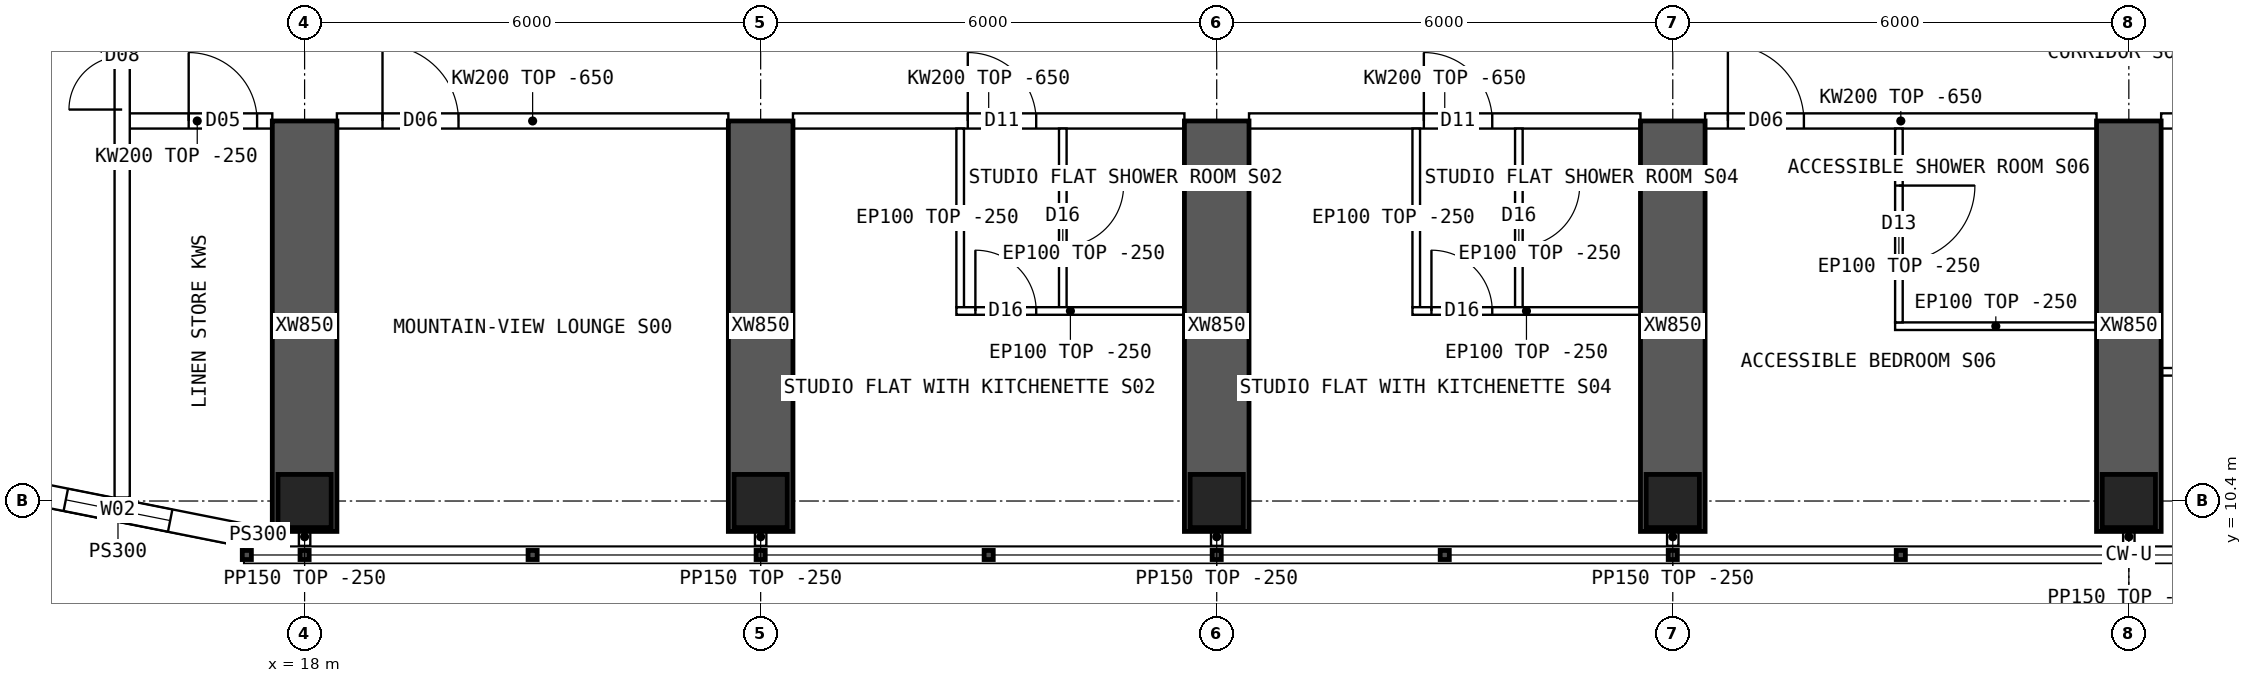
"""IFC4 building model, lengths in metres.
Left out: names, types, materials, properties, quantities, classifications, styles, units other than length and angle.
Written with IfcOpenShell. Run it as: python <this file> out.ifc"""

import sys

from ifc_helpers import new_model, si_unit, direction, frame, frame_2d, origin, origin_2d, place, context, subcontext, project, spatial, polyline, rectangle, hollow_rectangle, outline, extrude, element, fill, save


model = new_model("IFC4")
c1 = context("Model", 3, precision=1e-05, world=origin(), true_north=direction((0.0, 1.0)))
c2 = subcontext(c1, "Body", "Model", "MODEL_VIEW")
j1 = project(units=[si_unit("LENGTHUNIT", "METRE"), si_unit("PLANEANGLEUNIT", "RADIAN")], contexts=[c1])
p1 = place(None, origin())
s1 = spatial("IfcSite", under=j1, at=p1, CompositionType="ELEMENT")
p2 = place(p1, origin())
s2 = spatial("IfcBuilding", under=s1, at=p2, CompositionType="ELEMENT")
p3 = place(p2, frame((0.0, 0.0, 178.6)))
s3 = spatial("IfcBuildingStorey", under=s2, at=p3, CompositionType="ELEMENT", Elevation=178.6)
for number, where, z_axis, x_axis in (
    (1, (18.0, 10.4, 0.0), (0.0, 0.0, 1.0), (1.0, 0.0, 0.0)),
    (2, (24.0, 10.4, 0.0), (0.0, 0.0, 1.0), (1.0, 0.0, 0.0)),
    (3, (30.0, 10.4, 0.0), (0.0, 0.0, 1.0), (1.0, 0.0, 0.0)),
    (4, (36.0, 10.4, 0.0), (0.0, 0.0, 1.0), (1.0, 0.0, 0.0)),
    (5, (42.0, 10.4, 0.0), (0.0, 0.0, 1.0), (1.0, 0.0, 0.0)),
):
    element("IfcColumn", number, at=place(p3, frame(where, z_axis=z_axis, x_axis=x_axis)), inside=s3, PredefinedType="COLUMN", context=c2, shape_type="SweptSolid", body=[
        extrude(hollow_rectangle(XDim=0.7, YDim=0.7, WallThickness=0.07, at=origin_2d()), origin(), (0.0, 0.0, 1.0), 3.75),
    ])
for number, where, z_axis, x_axis in (
    (6, (18.0, 10.0, 0.0), (0.0, 0.0, 1.0), (0.0, 1.0, 0.0)),
    (7, (24.0, 10.0, 0.0), (0.0, 0.0, 1.0), (0.0, 1.0, 0.0)),
    (8, (30.0, 10.0, 0.0), (0.0, 0.0, 1.0), (0.0, 1.0, 0.0)),
    (9, (36.0, 10.0, 0.0), (0.0, 0.0, 1.0), (0.0, 1.0, 0.0)),
    (10, (42.0, 10.0, 0.0), (0.0, 0.0, 1.0), (0.0, 1.0, 0.0)),
):
    element("IfcWall", number, at=place(p3, frame(where, z_axis=z_axis, x_axis=x_axis)), inside=s3, PredefinedType="SHEAR", context=c2, shape_type="SweptSolid", body=[
        extrude(rectangle(XDim=5.4, YDim=0.85, at=frame_2d((2.7, 0.0))), origin(), (0.0, 0.0, 1.0), 3.75),
    ])
p4 = place(p3, frame((13.89, 10.608, 0.0), z_axis=(0.0, 0.0, 1.0), x_axis=(0.98078325777, -0.195100490205, 0.0)))
e11 = element("IfcWall", 11, at=p4, inside=s3, PredefinedType="SOLIDWALL", context=c2, shape_type="SweptSolid", body=[
    extrude(outline(polyline([(-0.03, -0.15), (3.405, -0.15), (3.345, 0.15), (0.03, 0.15), (-0.03, -0.15)])), origin(), (0.0, 0.0, 1.0), 3.5),
])
p5 = place(p4, frame((0.988, 0.0, 0.9)))
e12 = element("IfcOpeningElement", 12, at=p5, cuts=e11, PredefinedType="OPENING", context=c2, shape_type="SweptSolid", body=[
    extrude(rectangle(XDim=1.4, YDim=1.8, at=frame_2d((0.7, 0.9))), frame((0.0, 0.16, 0.0), z_axis=(0.0, -1.0, 0.0), x_axis=(1.0, 0.0, 0.0)), (0.0, 0.0, 1.0), 0.32),
])
p6 = place(p3, frame((17.2, 9.95, 0.0), z_axis=(0.0, 0.0, 1.0), x_axis=(1.0, 0.0, 0.0)))
e13 = element("IfcWall", 13, at=p6, inside=s3, PredefinedType="SOLIDWALL", context=c2, shape_type="SweptSolid", body=[
    extrude(rectangle(XDim=0.375, YDim=0.3, at=frame_2d((0.188, 0.0))), origin(), (0.0, 0.0, 1.0), 3.5),
])
p7 = place(p3, frame((15.6, 15.4, 0.0), z_axis=(0.0, 0.0, 1.0), x_axis=(1.0, 0.0, 0.0)))
e14 = element("IfcWall", 14, at=p7, inside=s3, PredefinedType="SOLIDWALL", context=c2, shape_type="SweptSolid", body=[
    extrude(rectangle(XDim=1.975, YDim=0.2, at=frame_2d((0.987, 0.0))), origin(), (0.0, 0.0, 1.0), 3.5),
])
p8 = place(p7, frame((0.875, 0.0, 0.0)))
e15 = element("IfcOpeningElement", 15, at=p8, cuts=e14, PredefinedType="OPENING", context=c2, shape_type="SweptSolid", body=[
    extrude(rectangle(XDim=0.9, YDim=2.1, at=frame_2d((0.45, 1.05))), frame((0.0, 0.11, 0.0), z_axis=(0.0, -1.0, 0.0), x_axis=(1.0, 0.0, 0.0)), (0.0, 0.0, 1.0), 0.22),
])
p9 = place(p3, frame((18.425, 15.4, 0.0), z_axis=(0.0, 0.0, 1.0), x_axis=(1.0, 0.0, 0.0)))
e16 = element("IfcWall", 16, at=p9, inside=s3, PredefinedType="SOLIDWALL", context=c2, shape_type="SweptSolid", body=[
    extrude(outline(polyline([(0.0, 0.0), (5.15, 0.0), (5.15, 3.1), (0.0, 3.1), (0.0, 0.0)])), frame((0.0, 0.1, 0.0), z_axis=(0.0, -1.0, 0.0), x_axis=(1.0, 0.0, 0.0)), (0.0, 0.0, 1.0), 0.2),
])
p10 = place(p9, frame((0.6, 0.0, 0.0)))
e17 = element("IfcOpeningElement", 17, at=p10, cuts=e16, PredefinedType="OPENING", context=c2, shape_type="SweptSolid", body=[
    extrude(rectangle(XDim=1.0, YDim=2.1, at=frame_2d((0.5, 1.05))), frame((0.0, 0.11, 0.0), z_axis=(0.0, -1.0, 0.0), x_axis=(1.0, 0.0, 0.0)), (0.0, 0.0, 1.0), 0.22),
])
p11 = place(p3, frame((24.425, 15.4, 0.0), z_axis=(0.0, 0.0, 1.0), x_axis=(1.0, 0.0, 0.0)))
e18 = element("IfcWall", 18, at=p11, inside=s3, PredefinedType="SOLIDWALL", context=c2, shape_type="SweptSolid", body=[
    extrude(outline(polyline([(0.0, 0.0), (5.15, 0.0), (5.15, 3.1), (0.0, 3.1), (0.0, 0.0)])), frame((0.0, 0.1, 0.0), z_axis=(0.0, -1.0, 0.0), x_axis=(1.0, 0.0, 0.0)), (0.0, 0.0, 1.0), 0.2),
])
p12 = place(p11, frame((2.3, 0.0, 0.0)))
e19 = element("IfcOpeningElement", 19, at=p12, cuts=e18, PredefinedType="OPENING", context=c2, shape_type="SweptSolid", body=[
    extrude(rectangle(XDim=0.9, YDim=2.1, at=frame_2d((0.45, 1.05))), frame((0.0, 0.11, 0.0), z_axis=(0.0, -1.0, 0.0), x_axis=(1.0, 0.0, 0.0)), (0.0, 0.0, 1.0), 0.22),
])
p13 = place(p3, frame((30.425, 15.4, 0.0), z_axis=(0.0, 0.0, 1.0), x_axis=(1.0, 0.0, 0.0)))
e20 = element("IfcWall", 20, at=p13, inside=s3, PredefinedType="SOLIDWALL", context=c2, shape_type="SweptSolid", body=[
    extrude(outline(polyline([(0.0, 0.0), (5.15, 0.0), (5.15, 3.1), (0.0, 3.1), (0.0, 0.0)])), frame((0.0, 0.1, 0.0), z_axis=(0.0, -1.0, 0.0), x_axis=(1.0, 0.0, 0.0)), (0.0, 0.0, 1.0), 0.2),
])
p14 = place(p13, frame((2.3, 0.0, 0.0)))
e21 = element("IfcOpeningElement", 21, at=p14, cuts=e20, PredefinedType="OPENING", context=c2, shape_type="SweptSolid", body=[
    extrude(rectangle(XDim=0.9, YDim=2.1, at=frame_2d((0.45, 1.05))), frame((0.0, 0.11, 0.0), z_axis=(0.0, -1.0, 0.0), x_axis=(1.0, 0.0, 0.0)), (0.0, 0.0, 1.0), 0.22),
])
p15 = place(p3, frame((36.425, 15.4, 0.0), z_axis=(0.0, 0.0, 1.0), x_axis=(1.0, 0.0, 0.0)))
e22 = element("IfcWall", 22, at=p15, inside=s3, PredefinedType="SOLIDWALL", context=c2, shape_type="SweptSolid", body=[
    extrude(outline(polyline([(0.0, 0.0), (5.15, 0.0), (5.15, 3.1), (0.0, 3.1), (0.0, 0.0)])), frame((0.0, 0.1, 0.0), z_axis=(0.0, -1.0, 0.0), x_axis=(1.0, 0.0, 0.0)), (0.0, 0.0, 1.0), 0.2),
])
p16 = place(p15, frame((0.3, 0.0, 0.0)))
e23 = element("IfcOpeningElement", 23, at=p16, cuts=e22, PredefinedType="OPENING", context=c2, shape_type="SweptSolid", body=[
    extrude(rectangle(XDim=1.0, YDim=2.1, at=frame_2d((0.5, 1.05))), frame((0.0, 0.11, 0.0), z_axis=(0.0, -1.0, 0.0), x_axis=(1.0, 0.0, 0.0)), (0.0, 0.0, 1.0), 0.22),
])
p17 = place(p3, frame((42.425, 15.4, 0.0), z_axis=(0.0, 0.0, 1.0), x_axis=(1.0, 0.0, 0.0)))
e24 = element("IfcWall", 24, at=p17, inside=s3, PredefinedType="SOLIDWALL", context=c2, shape_type="SweptSolid", body=[
    extrude(outline(polyline([(0.0, 0.0), (5.15, 0.0), (5.15, 3.1), (0.0, 3.1), (0.0, 0.0)])), frame((0.0, 0.1, 0.0), z_axis=(0.0, -1.0, 0.0), x_axis=(1.0, 0.0, 0.0)), (0.0, 0.0, 1.0), 0.2),
])
p18 = place(p17, frame((2.6, 0.0, 0.0)))
e25 = element("IfcOpeningElement", 25, at=p18, cuts=e24, PredefinedType="OPENING", context=c2, shape_type="SweptSolid", body=[
    extrude(rectangle(XDim=0.9, YDim=2.1, at=frame_2d((0.45, 1.05))), frame((0.0, 0.11, 0.0), z_axis=(0.0, -1.0, 0.0), x_axis=(1.0, 0.0, 0.0)), (0.0, 0.0, 1.0), 0.22),
])
p19 = place(p3, frame((29.575, 12.9, 0.0), z_axis=(0.0, 0.0, 1.0), x_axis=(-1.0, 0.0, 0.0)))
e26 = element("IfcWall", 26, at=p19, inside=s3, PredefinedType="PARTITIONING", context=c2, shape_type="SweptSolid", body=[
    extrude(rectangle(XDim=3.0, YDim=0.1, at=frame_2d((1.5, 0.0))), origin(), (0.0, 0.0, 1.0), 3.5),
])
p20 = place(p19, frame((1.95, 0.0, 0.0)))
e27 = element("IfcOpeningElement", 27, at=p20, cuts=e26, PredefinedType="OPENING", context=c2, shape_type="SweptSolid", body=[
    extrude(rectangle(XDim=0.8, YDim=2.1, at=frame_2d((0.4, 1.05))), frame((0.0, 0.06, 0.0), z_axis=(0.0, -1.0, 0.0), x_axis=(1.0, 0.0, 0.0)), (0.0, 0.0, 1.0), 0.12),
])
p21 = place(p3, frame((26.625, 12.95, 0.0), z_axis=(0.0, 0.0, 1.0), x_axis=(0.0, 1.0, 0.0)))
e28 = element("IfcWall", 28, at=p21, inside=s3, PredefinedType="PARTITIONING", context=c2, shape_type="SweptSolid", body=[
    extrude(outline(polyline([(0.0, 0.0), (2.35, 0.0), (2.35, 3.1), (2.302, 3.1), (2.3, 3.5), (0.0, 3.5), (0.0, 0.0)])), frame((0.0, 0.05, 0.0), z_axis=(0.0, -1.0, 0.0), x_axis=(1.0, 0.0, 0.0)), (0.0, 0.0, 1.0), 0.1),
])
p22 = place(p3, frame((27.975, 12.95, 0.0), z_axis=(0.0, 0.0, 1.0), x_axis=(0.0, 1.0, 0.0)))
e29 = element("IfcWall", 29, at=p22, inside=s3, PredefinedType="PARTITIONING", context=c2, shape_type="SweptSolid", body=[
    extrude(outline(polyline([(0.0, 0.0), (2.35, 0.0), (2.35, 3.1), (2.302, 3.1), (2.3, 3.5), (0.0, 3.5), (0.0, 0.0)])), frame((0.0, 0.05, 0.0), z_axis=(0.0, -1.0, 0.0), x_axis=(1.0, 0.0, 0.0)), (0.0, 0.0, 1.0), 0.1),
])
p23 = place(p22, frame((0.8, 0.0, 0.0)))
e30 = element("IfcOpeningElement", 30, at=p23, cuts=e29, PredefinedType="OPENING", context=c2, shape_type="SweptSolid", body=[
    extrude(rectangle(XDim=0.8, YDim=2.1, at=frame_2d((0.4, 1.05))), frame((0.0, 0.06, 0.0), z_axis=(0.0, -1.0, 0.0), x_axis=(1.0, 0.0, 0.0)), (0.0, 0.0, 1.0), 0.12),
])
p24 = place(p3, frame((35.575, 12.9, 0.0), z_axis=(0.0, 0.0, 1.0), x_axis=(-1.0, 0.0, 0.0)))
e31 = element("IfcWall", 31, at=p24, inside=s3, PredefinedType="PARTITIONING", context=c2, shape_type="SweptSolid", body=[
    extrude(rectangle(XDim=3.0, YDim=0.1, at=frame_2d((1.5, 0.0))), origin(), (0.0, 0.0, 1.0), 3.5),
])
p25 = place(p24, frame((1.95, 0.0, 0.0)))
e32 = element("IfcOpeningElement", 32, at=p25, cuts=e31, PredefinedType="OPENING", context=c2, shape_type="SweptSolid", body=[
    extrude(rectangle(XDim=0.8, YDim=2.1, at=frame_2d((0.4, 1.05))), frame((0.0, 0.06, 0.0), z_axis=(0.0, -1.0, 0.0), x_axis=(1.0, 0.0, 0.0)), (0.0, 0.0, 1.0), 0.12),
])
p26 = place(p3, frame((32.625, 12.95, 0.0), z_axis=(0.0, 0.0, 1.0), x_axis=(0.0, 1.0, 0.0)))
e33 = element("IfcWall", 33, at=p26, inside=s3, PredefinedType="PARTITIONING", context=c2, shape_type="SweptSolid", body=[
    extrude(outline(polyline([(0.0, 0.0), (2.35, 0.0), (2.35, 3.1), (2.302, 3.1), (2.3, 3.5), (0.0, 3.5), (0.0, 0.0)])), frame((0.0, 0.05, 0.0), z_axis=(0.0, -1.0, 0.0), x_axis=(1.0, 0.0, 0.0)), (0.0, 0.0, 1.0), 0.1),
])
p27 = place(p3, frame((33.975, 12.95, 0.0), z_axis=(0.0, 0.0, 1.0), x_axis=(0.0, 1.0, 0.0)))
e34 = element("IfcWall", 34, at=p27, inside=s3, PredefinedType="PARTITIONING", context=c2, shape_type="SweptSolid", body=[
    extrude(outline(polyline([(0.0, 0.0), (2.35, 0.0), (2.35, 3.1), (2.302, 3.1), (2.3, 3.5), (0.0, 3.5), (0.0, 0.0)])), frame((0.0, 0.05, 0.0), z_axis=(0.0, -1.0, 0.0), x_axis=(1.0, 0.0, 0.0)), (0.0, 0.0, 1.0), 0.1),
])
p28 = place(p27, frame((0.8, 0.0, 0.0)))
e35 = element("IfcOpeningElement", 35, at=p28, cuts=e34, PredefinedType="OPENING", context=c2, shape_type="SweptSolid", body=[
    extrude(rectangle(XDim=0.8, YDim=2.1, at=frame_2d((0.4, 1.05))), frame((0.0, 0.06, 0.0), z_axis=(0.0, -1.0, 0.0), x_axis=(1.0, 0.0, 0.0)), (0.0, 0.0, 1.0), 0.12),
])
p29 = place(p3, frame((38.925, 12.7, 0.0), z_axis=(0.0, 0.0, 1.0), x_axis=(1.0, 0.0, 0.0)))
e36 = element("IfcWall", 36, at=p29, inside=s3, PredefinedType="PARTITIONING", context=c2, shape_type="SweptSolid", body=[
    extrude(rectangle(XDim=2.65, YDim=0.1, at=frame_2d((1.325, 0.0))), origin(), (0.0, 0.0, 1.0), 3.5),
])
p30 = place(p3, frame((38.975, 12.75, 0.0), z_axis=(0.0, 0.0, 1.0), x_axis=(0.0, 1.0, 0.0)))
e37 = element("IfcWall", 37, at=p30, inside=s3, PredefinedType="PARTITIONING", context=c2, shape_type="SweptSolid", body=[
    extrude(outline(polyline([(0.0, 0.0), (2.55, 0.0), (2.55, 3.1), (2.502, 3.1), (2.5, 3.5), (0.0, 3.5), (0.0, 0.0)])), frame((0.0, 0.05, 0.0), z_axis=(0.0, -1.0, 0.0), x_axis=(1.0, 0.0, 0.0)), (0.0, 0.0, 1.0), 0.1),
])
p31 = place(p30, frame((0.8, 0.0, 0.0)))
e38 = element("IfcOpeningElement", 38, at=p31, cuts=e37, PredefinedType="OPENING", context=c2, shape_type="SweptSolid", body=[
    extrude(rectangle(XDim=1.0, YDim=2.1, at=frame_2d((0.5, 1.05))), frame((0.0, 0.06, 0.0), z_axis=(0.0, -1.0, 0.0), x_axis=(1.0, 0.0, 0.0)), (0.0, 0.0, 1.0), 0.12),
])
p32 = place(p3, frame((44.975, 12.1, 0.0), z_axis=(0.0, 0.0, 1.0), x_axis=(-1.0, 0.0, 0.0)))
e39 = element("IfcWall", 39, at=p32, inside=s3, PredefinedType="PARTITIONING", context=c2, shape_type="SweptSolid", body=[
    extrude(rectangle(XDim=2.55, YDim=0.1, at=frame_2d((1.275, 0.0))), origin(), (0.0, 0.0, 1.0), 3.5),
])
p33 = place(p32, frame((0.825, 0.0, 0.0)))
e40 = element("IfcOpeningElement", 40, at=p33, cuts=e39, PredefinedType="OPENING", context=c2, shape_type="SweptSolid", body=[
    extrude(rectangle(XDim=0.9, YDim=2.1, at=frame_2d((0.45, 1.05))), frame((0.0, 0.06, 0.0), z_axis=(0.0, -1.0, 0.0), x_axis=(1.0, 0.0, 0.0)), (0.0, 0.0, 1.0), 0.12),
])
p34 = place(p3, frame((15.6, 10.446, 0.0), z_axis=(0.0, 0.0, 1.0), x_axis=(0.0, 1.0, 0.0)))
e41 = element("IfcWall", 41, at=p34, inside=s3, PredefinedType="SOLIDWALL", context=c2, shape_type="SweptSolid", body=[
    extrude(rectangle(XDim=43.107, YDim=0.2, at=frame_2d((21.554, 0.0))), origin(), (0.0, 0.0, 1.0), 3.5),
])
p35 = place(p34, frame((5.104, 0.0, 0.0)))
e42 = element("IfcOpeningElement", 42, at=p35, cuts=e41, PredefinedType="OPENING", context=c2, shape_type="SweptSolid", body=[
    extrude(rectangle(XDim=1.4, YDim=2.1, at=frame_2d((0.7, 1.05))), frame((0.0, 0.11, 0.0), z_axis=(0.0, -1.0, 0.0), x_axis=(1.0, 0.0, 0.0)), (0.0, 0.0, 1.0), 0.22),
])
p36 = place(p34, frame((36.504, 0.0, 0.0)))
e43 = element("IfcOpeningElement", 43, at=p36, cuts=e41, PredefinedType="OPENING", context=c2, shape_type="SweptSolid", body=[
    extrude(rectangle(XDim=1.4, YDim=2.1, at=frame_2d((0.7, 1.05))), frame((0.0, 0.11, 0.0), z_axis=(0.0, -1.0, 0.0), x_axis=(1.0, 0.0, 0.0)), (0.0, 0.0, 1.0), 0.22),
])
for number, where, z_axis, x_axis in (
    (44, (18.0, 10.05, 0.0), (0.0, 0.0, 1.0), (0.0, -1.0, 0.0)),
    (45, (24.0, 10.05, 0.0), (0.0, 0.0, 1.0), (0.0, -1.0, 0.0)),
    (46, (30.0, 10.05, 0.0), (0.0, 0.0, 1.0), (0.0, -1.0, 0.0)),
    (47, (36.0, 10.05, 0.0), (0.0, 0.0, 1.0), (0.0, -1.0, 0.0)),
    (48, (42.0, 10.05, 0.0), (0.0, 0.0, 1.0), (0.0, -1.0, 0.0)),
):
    element("IfcWall", number, at=place(p3, frame(where, z_axis=z_axis, x_axis=x_axis)), inside=s3, PredefinedType="PARTITIONING", context=c2, shape_type="SweptSolid", body=[
        extrude(rectangle(XDim=0.24, YDim=0.15, at=frame_2d((0.12, 0.0))), origin(), (0.0, 0.0, 1.0), 3.5),
    ])
p37 = place(p5, origin())
e49 = element("IfcWindow", 49, at=p37, inside=s3, PartitioningType="SINGLE_PANEL", PredefinedType="WINDOW", context=c2, shape_type="SweptSolid", body=[
    extrude(rectangle(XDim=1.4, YDim=1.8, at=frame_2d((0.7, 0.9))), frame((0.0, 0.03, 0.0), z_axis=(0.0, -1.0, 0.0), x_axis=(1.0, 0.0, 0.0)), (0.0, 0.0, 1.0), 0.06),
])
fill(e12, e49)
p38 = place(p10, origin())
e50 = element("IfcDoor", 50, at=p38, inside=s3, OperationType="SINGLE_SWING_LEFT", PredefinedType="DOOR", context=c2, shape_type="SweptSolid", body=[
    extrude(rectangle(XDim=1.0, YDim=2.1, at=frame_2d((0.5, 1.05))), frame((0.0, 0.025, 0.0), z_axis=(0.0, -1.0, 0.0), x_axis=(1.0, 0.0, 0.0)), (0.0, 0.0, 1.0), 0.05),
])
fill(e17, e50)
p39 = place(p20, origin())
e51 = element("IfcDoor", 51, at=p39, inside=s3, OperationType="SINGLE_SWING_RIGHT", PredefinedType="DOOR", context=c2, shape_type="SweptSolid", body=[
    extrude(rectangle(XDim=0.8, YDim=2.1, at=frame_2d((0.4, 1.05))), frame((0.0, 0.025, 0.0), z_axis=(0.0, -1.0, 0.0), x_axis=(1.0, 0.0, 0.0)), (0.0, 0.0, 1.0), 0.05),
])
fill(e27, e51)
p40 = place(p23, origin())
e52 = element("IfcDoor", 52, at=p40, inside=s3, OperationType="SINGLE_SWING_RIGHT", PredefinedType="DOOR", context=c2, shape_type="SweptSolid", body=[
    extrude(rectangle(XDim=0.8, YDim=2.1, at=frame_2d((0.4, 1.05))), frame((0.0, 0.025, 0.0), z_axis=(0.0, -1.0, 0.0), x_axis=(1.0, 0.0, 0.0)), (0.0, 0.0, 1.0), 0.05),
])
fill(e30, e52)
p41 = place(p12, origin())
e53 = element("IfcDoor", 53, at=p41, inside=s3, OperationType="SINGLE_SWING_LEFT", PredefinedType="DOOR", context=c2, shape_type="SweptSolid", body=[
    extrude(rectangle(XDim=0.9, YDim=2.1, at=frame_2d((0.45, 1.05))), frame((0.0, 0.025, 0.0), z_axis=(0.0, -1.0, 0.0), x_axis=(1.0, 0.0, 0.0)), (0.0, 0.0, 1.0), 0.05),
])
fill(e19, e53)
p42 = place(p25, origin())
e54 = element("IfcDoor", 54, at=p42, inside=s3, OperationType="SINGLE_SWING_RIGHT", PredefinedType="DOOR", context=c2, shape_type="SweptSolid", body=[
    extrude(rectangle(XDim=0.8, YDim=2.1, at=frame_2d((0.4, 1.05))), frame((0.0, 0.025, 0.0), z_axis=(0.0, -1.0, 0.0), x_axis=(1.0, 0.0, 0.0)), (0.0, 0.0, 1.0), 0.05),
])
fill(e32, e54)
p43 = place(p28, origin())
e55 = element("IfcDoor", 55, at=p43, inside=s3, OperationType="SINGLE_SWING_RIGHT", PredefinedType="DOOR", context=c2, shape_type="SweptSolid", body=[
    extrude(rectangle(XDim=0.8, YDim=2.1, at=frame_2d((0.4, 1.05))), frame((0.0, 0.025, 0.0), z_axis=(0.0, -1.0, 0.0), x_axis=(1.0, 0.0, 0.0)), (0.0, 0.0, 1.0), 0.05),
])
fill(e35, e55)
p44 = place(p14, origin())
e56 = element("IfcDoor", 56, at=p44, inside=s3, OperationType="SINGLE_SWING_LEFT", PredefinedType="DOOR", context=c2, shape_type="SweptSolid", body=[
    extrude(rectangle(XDim=0.9, YDim=2.1, at=frame_2d((0.45, 1.05))), frame((0.0, 0.025, 0.0), z_axis=(0.0, -1.0, 0.0), x_axis=(1.0, 0.0, 0.0)), (0.0, 0.0, 1.0), 0.05),
])
fill(e21, e56)
p45 = place(p31, origin())
e57 = element("IfcDoor", 57, at=p45, inside=s3, OperationType="SINGLE_SWING_RIGHT", PredefinedType="DOOR", context=c2, shape_type="SweptSolid", body=[
    extrude(rectangle(XDim=1.0, YDim=2.1, at=frame_2d((0.5, 1.05))), frame((0.0, 0.025, 0.0), z_axis=(0.0, -1.0, 0.0), x_axis=(1.0, 0.0, 0.0)), (0.0, 0.0, 1.0), 0.05),
])
fill(e38, e57)
p46 = place(p16, origin())
e58 = element("IfcDoor", 58, at=p46, inside=s3, OperationType="SINGLE_SWING_LEFT", PredefinedType="DOOR", context=c2, shape_type="SweptSolid", body=[
    extrude(rectangle(XDim=1.0, YDim=2.1, at=frame_2d((0.5, 1.05))), frame((0.0, 0.025, 0.0), z_axis=(0.0, -1.0, 0.0), x_axis=(1.0, 0.0, 0.0)), (0.0, 0.0, 1.0), 0.05),
])
fill(e23, e58)
p47 = place(p35, origin())
e59 = element("IfcDoor", 59, at=p47, inside=s3, OperationType="DOUBLE_DOOR_SINGLE_SWING", PredefinedType="DOOR", context=c2, shape_type="SweptSolid", body=[
    extrude(rectangle(XDim=1.4, YDim=2.1, at=frame_2d((0.7, 1.05))), frame((0.0, 0.025, 0.0), z_axis=(0.0, -1.0, 0.0), x_axis=(1.0, 0.0, 0.0)), (0.0, 0.0, 1.0), 0.05),
])
fill(e42, e59)
p48 = place(p8, origin())
e60 = element("IfcDoor", 60, at=p48, inside=s3, OperationType="SINGLE_SWING_LEFT", PredefinedType="DOOR", context=c2, shape_type="SweptSolid", body=[
    extrude(rectangle(XDim=0.9, YDim=2.1, at=frame_2d((0.45, 1.05))), frame((0.0, 0.025, 0.0), z_axis=(0.0, -1.0, 0.0), x_axis=(1.0, 0.0, 0.0)), (0.0, 0.0, 1.0), 0.05),
])
fill(e15, e60)
save(model, sys.argv[1])
